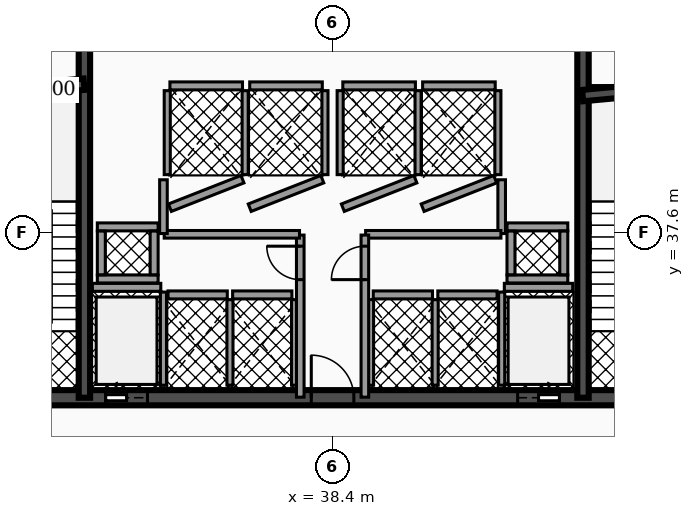
"""IFC4 building model, lengths in metres.
Left out: names, types, materials, properties, quantities, classifications, styles, units other than length and angle.
Written with IfcOpenShell. Run it as: python <this file> out.ifc"""

import sys

from ifc_helpers import new_model, si_unit, direction, frame, frame_2d, origin, place, context, subcontext, project, spatial, rectangle, extrude, element, fill, save


model = new_model("IFC4")
c1 = context("Model", 3, precision=1e-05, world=origin(), true_north=direction((0.0, 1.0)))
c2 = subcontext(c1, "Body", "Model", "MODEL_VIEW")
j1 = project(units=[si_unit("LENGTHUNIT", "METRE"), si_unit("PLANEANGLEUNIT", "RADIAN")], contexts=[c1])
p1 = place(None, origin())
s1 = spatial("IfcSite", under=j1, at=p1, CompositionType="ELEMENT")
p2 = place(p1, origin())
s2 = spatial("IfcBuilding", under=s1, at=p2, CompositionType="ELEMENT")
p3 = place(p2, frame((0.0, 0.0, 13.94)))
s3 = spatial("IfcBuildingStorey", under=s2, at=p3, CompositionType="ELEMENT", Elevation=13.94)
p4 = place(p3, frame((28.4, 33.25, 0.0), z_axis=(0.0, 0.0, 1.0), x_axis=(1.0, 0.0, 0.0)))
e1 = element("IfcWall", 1, at=p4, inside=s3, PredefinedType="SHEAR", context=c2, shape_type="SweptSolid", body=[
    extrude(rectangle(XDim=20.06, YDim=0.4, at=frame_2d((10.03, 0.0))), origin(), (0.0, 0.0, 1.0), 4.14),
])
p5 = place(p4, frame((4.03, 0.0, 0.0)))
e2 = element("IfcOpeningElement", 2, at=p5, cuts=e1, PredefinedType="OPENING", context=c2, shape_type="SweptSolid", body=[
    extrude(rectangle(XDim=1.1, YDim=2.15, at=frame_2d((0.55, 1.075))), frame((0.0, 0.21, 0.0), z_axis=(0.0, -1.0, 0.0), x_axis=(1.0, 0.0, 0.0)), (0.0, 0.0, 1.0), 0.42),
])
p6 = place(p4, frame((14.87, 0.0, 0.0)))
e3 = element("IfcOpeningElement", 3, at=p6, cuts=e1, PredefinedType="OPENING", context=c2, shape_type="SweptSolid", body=[
    extrude(rectangle(XDim=1.1, YDim=2.15, at=frame_2d((0.55, 1.075))), frame((0.0, 0.21, 0.0), z_axis=(0.0, -1.0, 0.0), x_axis=(1.0, 0.0, 0.0)), (0.0, 0.0, 1.0), 0.42),
])
p7 = place(p4, frame((1.31, 0.0, 0.0)))
e4 = element("IfcOpeningElement", 4, at=p7, cuts=e1, PredefinedType="OPENING", context=c2, shape_type="SweptSolid", body=[
    extrude(rectangle(XDim=1.1, YDim=2.2, at=frame_2d((0.55, 1.1))), frame((0.0, 0.21, 0.0), z_axis=(0.0, -1.0, 0.0), x_axis=(1.0, 0.0, 0.0)), (0.0, 0.0, 1.0), 0.42),
])
p8 = place(p4, frame((9.44, 0.0, 0.0)))
e5 = element("IfcOpeningElement", 5, at=p8, cuts=e1, PredefinedType="OPENING", context=c2, shape_type="SweptSolid", body=[
    extrude(rectangle(XDim=1.12, YDim=2.05, at=frame_2d((0.56, 1.025))), frame((0.0, 0.21, 0.0), z_axis=(0.0, -1.0, 0.0), x_axis=(1.0, 0.0, 0.0)), (0.0, 0.0, 1.0), 0.42),
])
p9 = place(p4, frame((17.65, 0.0, 0.0)))
e6 = element("IfcOpeningElement", 6, at=p9, cuts=e1, PredefinedType="OPENING", context=c2, shape_type="SweptSolid", body=[
    extrude(rectangle(XDim=1.1, YDim=2.2, at=frame_2d((0.55, 1.1))), frame((0.0, 0.21, 0.0), z_axis=(0.0, -1.0, 0.0), x_axis=(1.0, 0.0, 0.0)), (0.0, 0.0, 1.0), 0.42),
])
for number, where, z_axis, x_axis in (
    (7, (31.87, 33.25, 0.0), (0.0, 0.0, 1.0), (0.0, 1.0, 0.0)),
    (8, (44.99, 33.25, 0.0), (0.0, 0.0, 1.0), (0.0, 1.0, 0.0)),
):
    element("IfcWall", number, at=place(p3, frame(where, z_axis=z_axis, x_axis=x_axis)), inside=s3, PredefinedType="SHEAR", context=c2, shape_type="SweptSolid", body=[
        extrude(rectangle(XDim=10.2, YDim=0.3, at=frame_2d((5.1, 0.0))), origin(), (0.0, 0.0, 1.0), 4.14),
    ])
p10 = place(p3, frame((28.64, 41.2, 0.0), z_axis=(0.0, 0.0, 1.0), x_axis=(0.995687118776, 0.092774789157, 0.0)))
e9 = element("IfcWall", 9, at=p10, inside=s3, PredefinedType="SHEAR", context=c2, shape_type="SweptSolid", body=[
    extrude(rectangle(XDim=3.234, YDim=0.3, at=frame_2d((1.617, 0.0))), origin(), (0.0, 0.0, 1.0), 4.14),
])
p11 = place(p3, frame((44.98, 41.2, 0.0), z_axis=(0.0, 0.0, 1.0), x_axis=(0.995686468965, 0.09278176286, 0.0)))
e10 = element("IfcWall", 10, at=p11, inside=s3, PredefinedType="SHEAR", context=c2, shape_type="SweptSolid", body=[
    extrude(rectangle(XDim=3.234, YDim=0.3, at=frame_2d((1.617, 0.0))), origin(), (0.0, 0.0, 1.0), 4.14),
])
p12 = place(p3, frame((32.08, 36.155, 0.0), z_axis=(0.0, 0.0, 1.0), x_axis=(1.0, 0.0, 0.0)))
e11 = element("IfcWall", 11, at=p12, inside=s3, PredefinedType="SOLIDWALL", context=c2, shape_type="SweptSolid", body=[
    extrude(rectangle(XDim=1.8, YDim=0.21, at=frame_2d((0.9, 0.0))), origin(), (0.0, 0.0, 1.0), 3.112),
])
p13 = place(p3, frame((33.95, 33.58, 0.0), z_axis=(0.0, 0.0, 1.0), x_axis=(0.0, 1.0, 0.0)))
e12 = element("IfcWall", 12, at=p13, inside=s3, PredefinedType="SOLIDWALL", context=c2, shape_type="SweptSolid", body=[
    extrude(rectangle(XDim=2.45, YDim=0.16, at=frame_2d((1.225, 0.0))), origin(), (0.0, 0.0, 1.0), 3.112),
])
p14 = place(p3, frame((42.92, 36.155, 0.0), z_axis=(0.0, 0.0, 1.0), x_axis=(1.0, 0.0, 0.0)))
e13 = element("IfcWall", 13, at=p14, inside=s3, PredefinedType="SOLIDWALL", context=c2, shape_type="SweptSolid", body=[
    extrude(rectangle(XDim=1.8, YDim=0.21, at=frame_2d((0.9, 0.0))), origin(), (0.0, 0.0, 1.0), 3.112),
])
p15 = place(p3, frame((42.85, 33.58, 0.0), z_axis=(0.0, 0.0, 1.0), x_axis=(0.0, 1.0, 0.0)))
e14 = element("IfcWall", 14, at=p15, inside=s3, PredefinedType="SOLIDWALL", context=c2, shape_type="SweptSolid", body=[
    extrude(rectangle(XDim=2.45, YDim=0.16, at=frame_2d((1.225, 0.0))), origin(), (0.0, 0.0, 1.0), 3.112),
])
p16 = place(p3, frame((34.12, 38.25, 0.0), z_axis=(0.0, 0.0, 1.0), x_axis=(0.930804993012, 0.36551616241, 0.0)))
e15 = element("IfcWall", 15, at=p16, inside=s3, PredefinedType="SOLIDWALL", context=c2, shape_type="SweptSolid", body=[
    extrude(rectangle(XDim=2.052, YDim=0.21, at=frame_2d((1.026, 0.0))), origin(), (0.0, 0.0, 1.0), 3.112),
])
p17 = place(p3, frame((34.12, 41.455, 0.0), z_axis=(0.0, 0.0, 1.0), x_axis=(1.0, 0.0, 0.0)))
e16 = element("IfcWall", 16, at=p17, inside=s3, PredefinedType="SOLIDWALL", context=c2, shape_type="SweptSolid", body=[
    extrude(rectangle(XDim=1.91, YDim=0.21, at=frame_2d((0.955, 0.0))), origin(), (0.0, 0.0, 1.0), 3.112),
])
for number, where, z_axis, x_axis in (
    (17, (34.05, 39.12, 0.0), (0.0, 0.0, 1.0), (0.0, 1.0, 0.0)),
    (18, (36.1, 39.12, 0.0), (0.0, 0.0, 1.0), (0.0, 1.0, 0.0)),
):
    element("IfcWall", number, at=place(p3, frame(where, z_axis=z_axis, x_axis=x_axis)), inside=s3, PredefinedType="SOLIDWALL", context=c2, shape_type="SweptSolid", body=[
        extrude(rectangle(XDim=2.21, YDim=0.16, at=frame_2d((1.105, 0.0))), origin(), (0.0, 0.0, 1.0), 3.112),
    ])
p18 = place(p3, frame((36.22, 38.25, 0.0), z_axis=(0.0, 0.0, 1.0), x_axis=(0.930804993012, 0.36551616241, 0.0)))
e19 = element("IfcWall", 19, at=p18, inside=s3, PredefinedType="SOLIDWALL", context=c2, shape_type="SweptSolid", body=[
    extrude(rectangle(XDim=2.052, YDim=0.21, at=frame_2d((1.026, 0.0))), origin(), (0.0, 0.0, 1.0), 3.112),
])
p19 = place(p3, frame((36.22, 41.455, 0.0), z_axis=(0.0, 0.0, 1.0), x_axis=(1.0, 0.0, 0.0)))
e20 = element("IfcWall", 20, at=p19, inside=s3, PredefinedType="SOLIDWALL", context=c2, shape_type="SweptSolid", body=[
    extrude(rectangle(XDim=1.91, YDim=0.21, at=frame_2d((0.955, 0.0))), origin(), (0.0, 0.0, 1.0), 3.112),
])
p20 = place(p3, frame((38.2, 39.12, 0.0), z_axis=(0.0, 0.0, 1.0), x_axis=(0.0, 1.0, 0.0)))
e21 = element("IfcWall", 21, at=p20, inside=s3, PredefinedType="SOLIDWALL", context=c2, shape_type="SweptSolid", body=[
    extrude(rectangle(XDim=2.21, YDim=0.16, at=frame_2d((1.105, 0.0))), origin(), (0.0, 0.0, 1.0), 3.112),
])
p21 = place(p3, frame((38.67, 38.25, 0.0), z_axis=(0.0, 0.0, 1.0), x_axis=(0.930820886763, 0.3654756856, 0.0)))
e22 = element("IfcWall", 22, at=p21, inside=s3, PredefinedType="SOLIDWALL", context=c2, shape_type="SweptSolid", body=[
    extrude(rectangle(XDim=2.052, YDim=0.21, at=frame_2d((1.026, 0.0))), origin(), (0.0, 0.0, 1.0), 3.112),
])
p22 = place(p3, frame((38.67, 41.455, 0.0), z_axis=(0.0, 0.0, 1.0), x_axis=(1.0, 0.0, 0.0)))
e23 = element("IfcWall", 23, at=p22, inside=s3, PredefinedType="SOLIDWALL", context=c2, shape_type="SweptSolid", body=[
    extrude(rectangle(XDim=1.91, YDim=0.21, at=frame_2d((0.955, 0.0))), origin(), (0.0, 0.0, 1.0), 3.112),
])
for number, where, z_axis, x_axis in (
    (24, (38.6, 39.12, 0.0), (0.0, 0.0, 1.0), (0.0, 1.0, 0.0)),
    (25, (40.65, 39.12, 0.0), (0.0, 0.0, 1.0), (0.0, 1.0, 0.0)),
):
    element("IfcWall", number, at=place(p3, frame(where, z_axis=z_axis, x_axis=x_axis)), inside=s3, PredefinedType="SOLIDWALL", context=c2, shape_type="SweptSolid", body=[
        extrude(rectangle(XDim=2.21, YDim=0.16, at=frame_2d((1.105, 0.0))), origin(), (0.0, 0.0, 1.0), 3.112),
    ])
p23 = place(p3, frame((40.77, 38.25, 0.0), z_axis=(0.0, 0.0, 1.0), x_axis=(0.930804993012, 0.36551616241, 0.0)))
e26 = element("IfcWall", 26, at=p23, inside=s3, PredefinedType="SOLIDWALL", context=c2, shape_type="SweptSolid", body=[
    extrude(rectangle(XDim=2.052, YDim=0.21, at=frame_2d((1.026, 0.0))), origin(), (0.0, 0.0, 1.0), 3.112),
])
p24 = place(p3, frame((40.77, 41.455, 0.0), z_axis=(0.0, 0.0, 1.0), x_axis=(1.0, 0.0, 0.0)))
e27 = element("IfcWall", 27, at=p24, inside=s3, PredefinedType="SOLIDWALL", context=c2, shape_type="SweptSolid", body=[
    extrude(rectangle(XDim=1.91, YDim=0.21, at=frame_2d((0.955, 0.0))), origin(), (0.0, 0.0, 1.0), 3.112),
])
p25 = place(p3, frame((42.75, 39.12, 0.0), z_axis=(0.0, 0.0, 1.0), x_axis=(0.0, 1.0, 0.0)))
e28 = element("IfcWall", 28, at=p25, inside=s3, PredefinedType="SOLIDWALL", context=c2, shape_type="SweptSolid", body=[
    extrude(rectangle(XDim=2.21, YDim=0.16, at=frame_2d((1.105, 0.0))), origin(), (0.0, 0.0, 1.0), 3.112),
])
p26 = place(p3, frame((34.07, 35.955, 0.0), z_axis=(0.0, 0.0, 1.0), x_axis=(1.0, 0.0, 0.0)))
e29 = element("IfcWall", 29, at=p26, inside=s3, PredefinedType="SOLIDWALL", context=c2, shape_type="SweptSolid", body=[
    extrude(rectangle(XDim=1.56, YDim=0.21, at=frame_2d((0.78, 0.0))), origin(), (0.0, 0.0, 1.0), 3.112),
])
p27 = place(p3, frame((35.7, 33.58, 0.0), z_axis=(0.0, 0.0, 1.0), x_axis=(0.0, 1.0, 0.0)))
e30 = element("IfcWall", 30, at=p27, inside=s3, PredefinedType="SOLIDWALL", context=c2, shape_type="SweptSolid", body=[
    extrude(rectangle(XDim=2.25, YDim=0.16, at=frame_2d((1.125, 0.0))), origin(), (0.0, 0.0, 1.0), 3.112),
])
p28 = place(p3, frame((35.77, 35.955, 0.0), z_axis=(0.0, 0.0, 1.0), x_axis=(1.0, 0.0, 0.0)))
e31 = element("IfcWall", 31, at=p28, inside=s3, PredefinedType="SOLIDWALL", context=c2, shape_type="SweptSolid", body=[
    extrude(rectangle(XDim=1.56, YDim=0.21, at=frame_2d((0.78, 0.0))), origin(), (0.0, 0.0, 1.0), 3.112),
])
p29 = place(p3, frame((37.4, 33.58, 0.0), z_axis=(0.0, 0.0, 1.0), x_axis=(0.0, 1.0, 0.0)))
e32 = element("IfcWall", 32, at=p29, inside=s3, PredefinedType="SOLIDWALL", context=c2, shape_type="SweptSolid", body=[
    extrude(rectangle(XDim=2.25, YDim=0.16, at=frame_2d((1.125, 0.0))), origin(), (0.0, 0.0, 1.0), 3.112),
])
p30 = place(p3, frame((39.47, 35.955, 0.0), z_axis=(0.0, 0.0, 1.0), x_axis=(1.0, 0.0, 0.0)))
e33 = element("IfcWall", 33, at=p30, inside=s3, PredefinedType="SOLIDWALL", context=c2, shape_type="SweptSolid", body=[
    extrude(rectangle(XDim=1.56, YDim=0.21, at=frame_2d((0.78, 0.0))), origin(), (0.0, 0.0, 1.0), 3.112),
])
for number, where, z_axis, x_axis in (
    (34, (39.4, 33.58, 0.0), (0.0, 0.0, 1.0), (0.0, 1.0, 0.0)),
    (35, (41.1, 33.58, 0.0), (0.0, 0.0, 1.0), (0.0, 1.0, 0.0)),
):
    element("IfcWall", number, at=place(p3, frame(where, z_axis=z_axis, x_axis=x_axis)), inside=s3, PredefinedType="SOLIDWALL", context=c2, shape_type="SweptSolid", body=[
        extrude(rectangle(XDim=2.25, YDim=0.16, at=frame_2d((1.125, 0.0))), origin(), (0.0, 0.0, 1.0), 3.112),
    ])
p31 = place(p3, frame((41.17, 35.955, 0.0), z_axis=(0.0, 0.0, 1.0), x_axis=(1.0, 0.0, 0.0)))
e36 = element("IfcWall", 36, at=p31, inside=s3, PredefinedType="SOLIDWALL", context=c2, shape_type="SweptSolid", body=[
    extrude(rectangle(XDim=1.56, YDim=0.21, at=frame_2d((0.78, 0.0))), origin(), (0.0, 0.0, 1.0), 3.112),
])
for number, where, z_axis, x_axis in (
    (37, (32.21, 36.375, 0.0), (0.0, 0.0, 1.0), (1.0, 0.0, 0.0)),
    (38, (32.21, 37.745, 0.0), (0.0, 0.0, 1.0), (1.0, 0.0, 0.0)),
):
    element("IfcWall", number, at=place(p3, frame(where, z_axis=z_axis, x_axis=x_axis)), inside=s3, PredefinedType="SOLIDWALL", context=c2, shape_type="SweptSolid", body=[
        extrude(rectangle(XDim=1.6, YDim=0.21, at=frame_2d((0.8, 0.0))), origin(), (0.0, 0.0, 1.0), 4.14),
    ])
for number, where, z_axis, x_axis in (
    (39, (32.315, 36.485, 0.0), (0.0, 0.0, 1.0), (0.0, 1.0, 0.0)),
    (40, (33.705, 36.485, 0.0), (0.0, 0.0, 1.0), (0.0, 1.0, 0.0)),
):
    element("IfcWall", number, at=place(p3, frame(where, z_axis=z_axis, x_axis=x_axis)), inside=s3, PredefinedType="SOLIDWALL", context=c2, shape_type="SweptSolid", body=[
        extrude(rectangle(XDim=1.15, YDim=0.21, at=frame_2d((0.575, 0.0))), origin(), (0.0, 0.0, 1.0), 4.14),
    ])
for number, where, z_axis, x_axis in (
    (41, (42.99, 36.375, 0.0), (0.0, 0.0, 1.0), (1.0, 0.0, 0.0)),
    (42, (42.99, 37.745, 0.0), (0.0, 0.0, 1.0), (1.0, 0.0, 0.0)),
):
    element("IfcWall", number, at=place(p3, frame(where, z_axis=z_axis, x_axis=x_axis)), inside=s3, PredefinedType="SOLIDWALL", context=c2, shape_type="SweptSolid", body=[
        extrude(rectangle(XDim=1.6, YDim=0.21, at=frame_2d((0.8, 0.0))), origin(), (0.0, 0.0, 1.0), 4.14),
    ])
for number, where, z_axis, x_axis in (
    (43, (43.095, 36.485, 0.0), (0.0, 0.0, 1.0), (0.0, 1.0, 0.0)),
    (44, (44.485, 36.485, 0.0), (0.0, 0.0, 1.0), (0.0, 1.0, 0.0)),
):
    element("IfcWall", number, at=place(p3, frame(where, z_axis=z_axis, x_axis=x_axis)), inside=s3, PredefinedType="SOLIDWALL", context=c2, shape_type="SweptSolid", body=[
        extrude(rectangle(XDim=1.15, YDim=0.21, at=frame_2d((0.575, 0.0))), origin(), (0.0, 0.0, 1.0), 4.14),
    ])
p32 = place(p3, frame((37.55, 33.265, 0.0), z_axis=(0.0, 0.0, 1.0), x_axis=(0.0, 1.0, 0.0)))
e45 = element("IfcWall", 45, at=p32, inside=s3, PredefinedType="PARTITIONING", context=c2, shape_type="SweptSolid", body=[
    extrude(rectangle(XDim=4.265, YDim=0.2, at=frame_2d((2.133, 0.0))), origin(), (0.0, 0.0, 1.0), 3.097),
])
p33 = place(p32, frame((3.093, 0.0, 0.0)))
e46 = element("IfcOpeningElement", 46, at=p33, cuts=e45, PredefinedType="OPENING", context=c2, shape_type="SweptSolid", body=[
    extrude(rectangle(XDim=0.88, YDim=2.05, at=frame_2d((0.44, 1.025))), frame((0.0, 0.11, 0.0), z_axis=(0.0, -1.0, 0.0), x_axis=(1.0, 0.0, 0.0)), (0.0, 0.0, 1.0), 0.22),
])
p34 = place(p3, frame((33.97, 37.55, 0.0), z_axis=(0.0, 0.0, 1.0), x_axis=(1.0, 0.0, 0.0)))
e47 = element("IfcWall", 47, at=p34, inside=s3, PredefinedType="PARTITIONING", context=c2, shape_type="SweptSolid", body=[
    extrude(rectangle(XDim=3.56, YDim=0.2, at=frame_2d((1.78, 0.0))), origin(), (0.0, 0.0, 1.0), 3.097),
])
for number, where, z_axis, x_axis in (
    (48, (33.95, 37.57, 0.0), (0.0, 0.0, 1.0), (0.0, 1.0, 0.0)),
    (49, (42.85, 37.57, 0.0), (0.0, 0.0, 1.0), (0.0, 1.0, 0.0)),
):
    element("IfcWall", number, at=place(p3, frame(where, z_axis=z_axis, x_axis=x_axis)), inside=s3, PredefinedType="PARTITIONING", context=c2, shape_type="SweptSolid", body=[
        extrude(rectangle(XDim=1.415, YDim=0.2, at=frame_2d((0.708, 0.0))), origin(), (0.0, 0.0, 1.0), 3.097),
    ])
p35 = place(p3, frame((39.27, 37.55, 0.0), z_axis=(0.0, 0.0, 1.0), x_axis=(1.0, 0.0, 0.0)))
e50 = element("IfcWall", 50, at=p35, inside=s3, PredefinedType="PARTITIONING", context=c2, shape_type="SweptSolid", body=[
    extrude(rectangle(XDim=3.56, YDim=0.2, at=frame_2d((1.78, 0.0))), origin(), (0.0, 0.0, 1.0), 3.097),
])
p36 = place(p3, frame((39.25, 33.265, 0.0), z_axis=(0.0, 0.0, 1.0), x_axis=(0.0, 1.0, 0.0)))
e51 = element("IfcWall", 51, at=p36, inside=s3, PredefinedType="PARTITIONING", context=c2, shape_type="SweptSolid", body=[
    extrude(rectangle(XDim=4.265, YDim=0.2, at=frame_2d((2.133, 0.0))), origin(), (0.0, 0.0, 1.0), 3.097),
])
p37 = place(p36, frame((3.093, 0.0, 0.0)))
e52 = element("IfcOpeningElement", 52, at=p37, cuts=e51, PredefinedType="OPENING", context=c2, shape_type="SweptSolid", body=[
    extrude(rectangle(XDim=0.88, YDim=2.05, at=frame_2d((0.44, 1.025))), frame((0.0, 0.11, 0.0), z_axis=(0.0, -1.0, 0.0), x_axis=(1.0, 0.0, 0.0)), (0.0, 0.0, 1.0), 0.22),
])
p38 = place(p5, origin())
e53 = element("IfcDoor", 53, at=p38, inside=s3, OperationType="SLIDING_TO_LEFT", PredefinedType="DOOR", context=c2, shape_type="SweptSolid", body=[
    extrude(rectangle(XDim=1.1, YDim=2.15, at=frame_2d((0.55, 1.075))), frame((0.0, 0.025, 0.0), z_axis=(0.0, -1.0, 0.0), x_axis=(1.0, 0.0, 0.0)), (0.0, 0.0, 1.0), 0.05),
])
fill(e2, e53)
p39 = place(p6, origin())
e54 = element("IfcDoor", 54, at=p39, inside=s3, OperationType="SLIDING_TO_RIGHT", PredefinedType="DOOR", context=c2, shape_type="SweptSolid", body=[
    extrude(rectangle(XDim=1.1, YDim=2.15, at=frame_2d((0.55, 1.075))), frame((0.0, 0.025, 0.0), z_axis=(0.0, -1.0, 0.0), x_axis=(1.0, 0.0, 0.0)), (0.0, 0.0, 1.0), 0.05),
])
fill(e3, e54)
p40 = place(p8, origin())
e55 = element("IfcDoor", 55, at=p40, inside=s3, OperationType="SINGLE_SWING_LEFT", PredefinedType="DOOR", context=c2, shape_type="SweptSolid", body=[
    extrude(rectangle(XDim=1.12, YDim=2.05, at=frame_2d((0.56, 1.025))), frame((0.0, 0.025, 0.0), z_axis=(0.0, -1.0, 0.0), x_axis=(1.0, 0.0, 0.0)), (0.0, 0.0, 1.0), 0.05),
])
fill(e5, e55)
p41 = place(p33, origin())
e56 = element("IfcDoor", 56, at=p41, inside=s3, OperationType="SINGLE_SWING_RIGHT", PredefinedType="DOOR", context=c2, shape_type="SweptSolid", body=[
    extrude(rectangle(XDim=0.88, YDim=2.05, at=frame_2d((0.44, 1.025))), frame((0.0, 0.025, 0.0), z_axis=(0.0, -1.0, 0.0), x_axis=(1.0, 0.0, 0.0)), (0.0, 0.0, 1.0), 0.05),
])
fill(e46, e56)
p42 = place(p37, origin())
e57 = element("IfcDoor", 57, at=p42, inside=s3, OperationType="SINGLE_SWING_LEFT", PredefinedType="DOOR", context=c2, shape_type="SweptSolid", body=[
    extrude(rectangle(XDim=0.88, YDim=2.05, at=frame_2d((0.44, 1.025))), frame((0.0, 0.025, 0.0), z_axis=(0.0, -1.0, 0.0), x_axis=(1.0, 0.0, 0.0)), (0.0, 0.0, 1.0), 0.05),
])
fill(e52, e57)
save(model, sys.argv[1])
